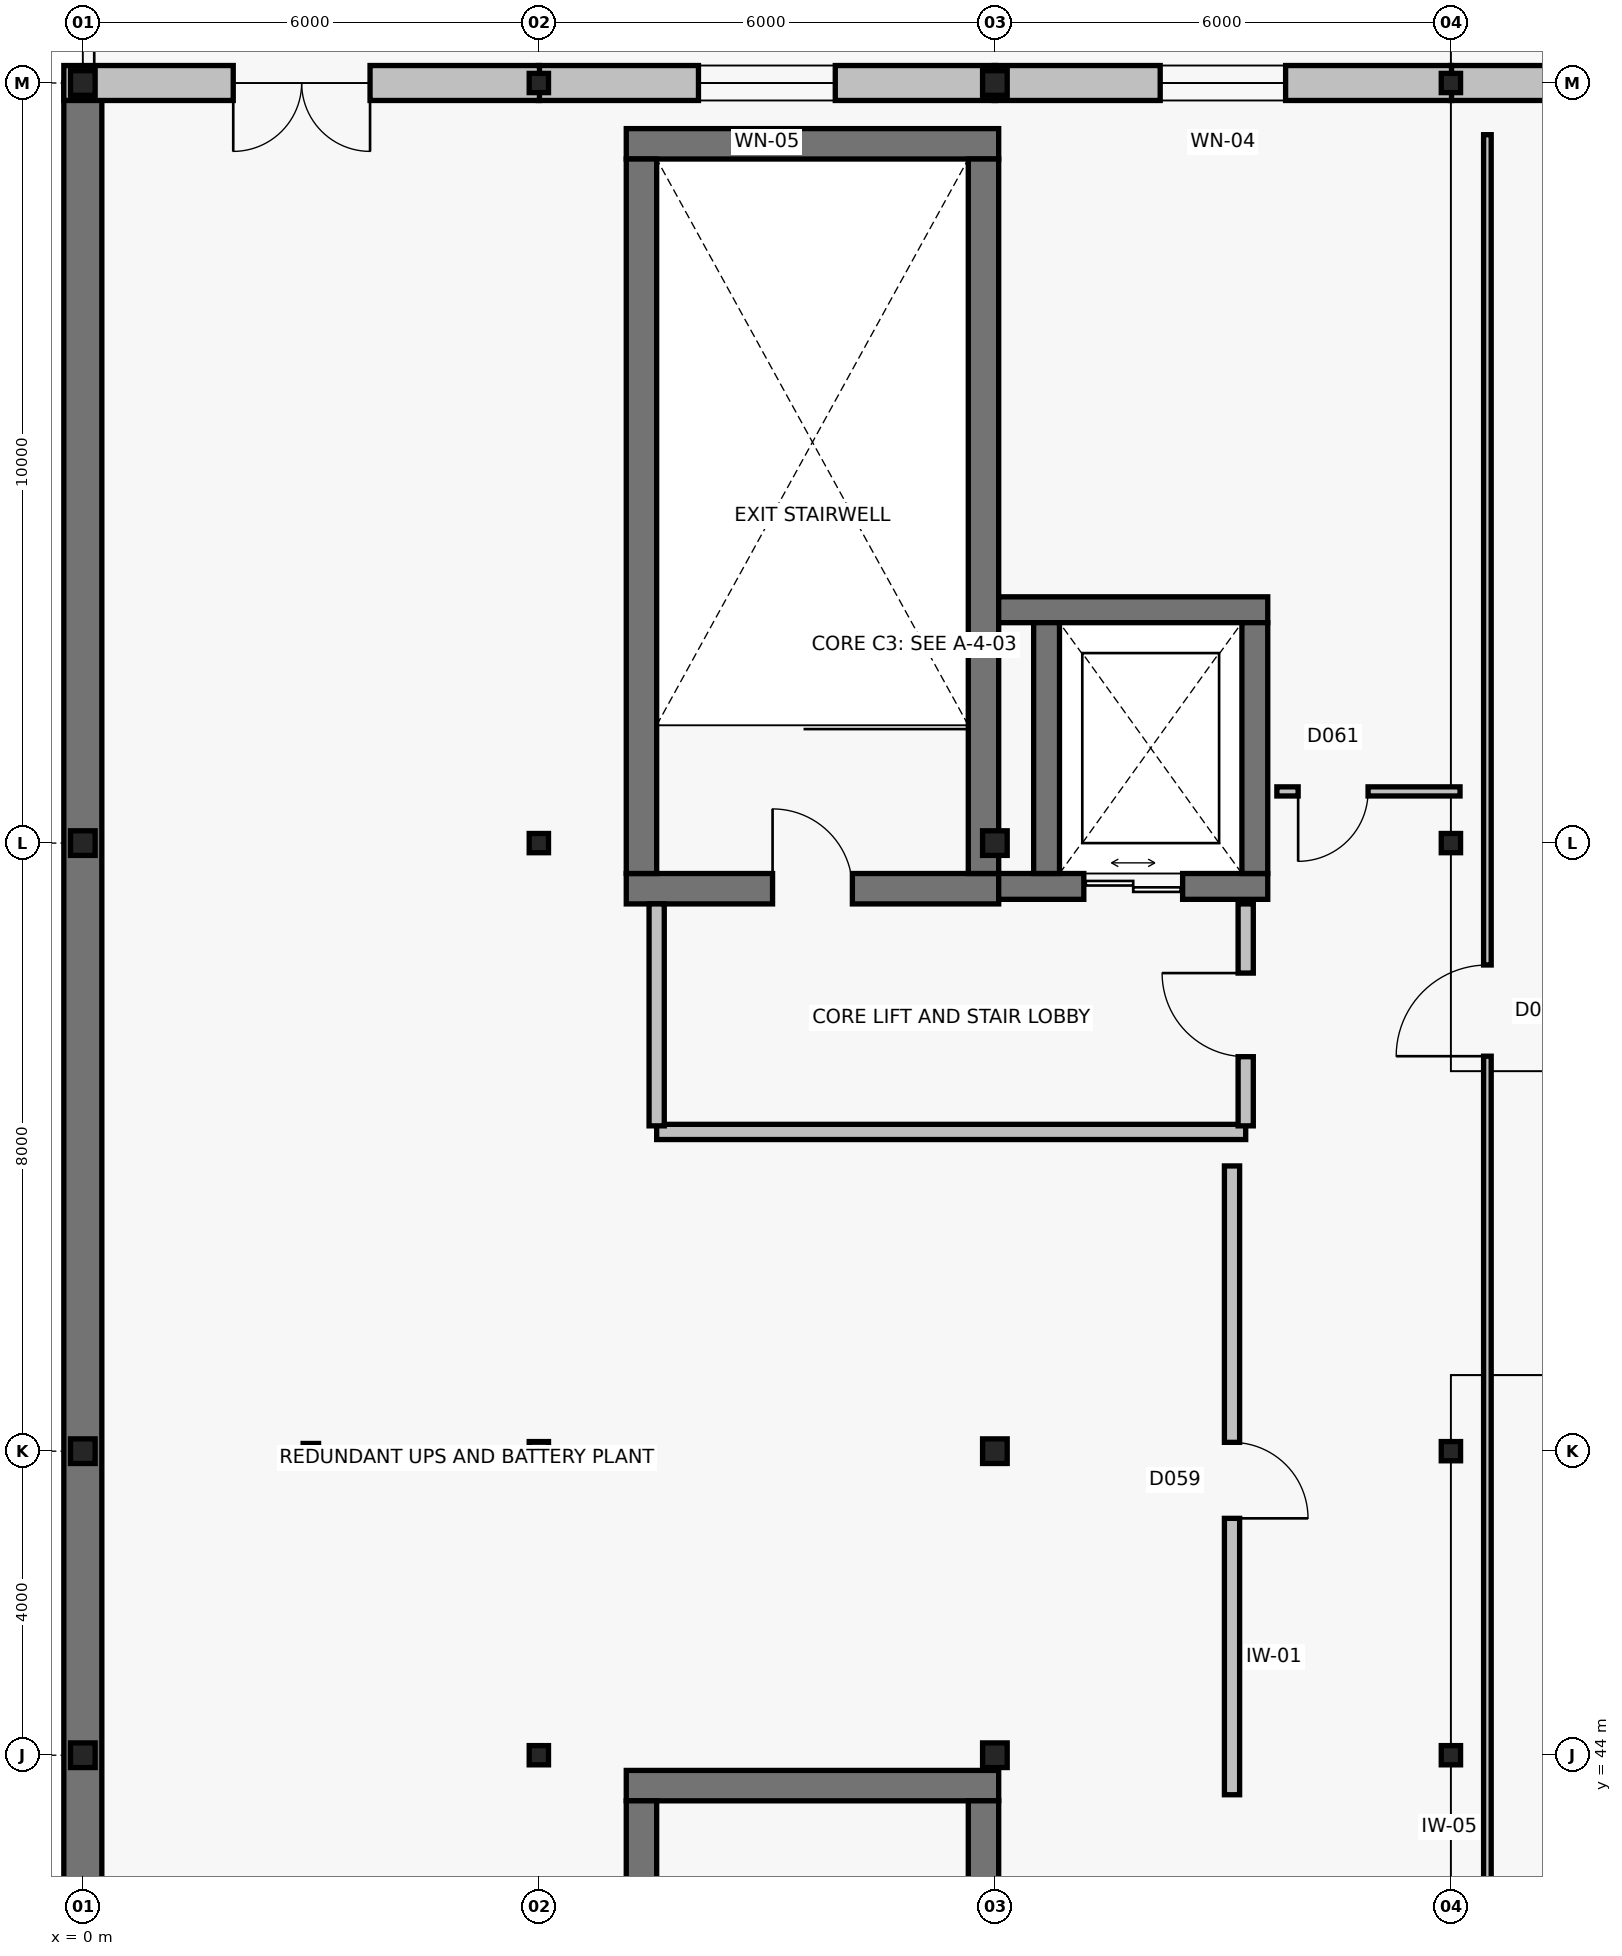
"""IFC4 building model, lengths in metres.
Left out: names, types, materials, properties, quantities, classifications, styles, units other than length and angle.
Written with IfcOpenShell. Run it as: python <this file> out.ifc"""

import sys

from ifc_helpers import new_model, si_unit, direction, frame, frame_2d, origin, origin_2d, place, context, subcontext, project, spatial, rectangle, hollow_rectangle, hollow_circle, i_section, extrude, element, fill, save


model = new_model("IFC4")
c1 = context("Model", 3, precision=1e-05, world=origin(), true_north=direction((0.0, 1.0)))
c2 = subcontext(c1, "Body", "Model", "MODEL_VIEW")
j1 = project(units=[si_unit("LENGTHUNIT", "METRE"), si_unit("PLANEANGLEUNIT", "RADIAN")], contexts=[c1])
p1 = place(None, origin())
s1 = spatial("IfcSite", under=j1, at=p1, CompositionType="ELEMENT")
p2 = place(p1, origin())
s2 = spatial("IfcBuilding", under=s1, at=p2, CompositionType="ELEMENT")
p3 = place(p2, frame((0.0, 0.0, 19.4)))
s3 = spatial("IfcBuildingStorey", under=s2, at=p3, CompositionType="ELEMENT", Elevation=19.4)
for number, where, z_axis, x_axis in (
    (1, (0.0, 44.0, 0.0), (0.0, 0.0, 1.0), (1.0, 0.0, 0.0)),
    (2, (0.0, 48.0, 0.0), (0.0, 0.0, 1.0), (1.0, 0.0, 0.0)),
    (3, (0.0, 56.0, 0.0), (0.0, 0.0, 1.0), (1.0, 0.0, 0.0)),
    (4, (0.0, 66.0, 0.0), (0.0, 0.0, 1.0), (1.0, 0.0, 0.0)),
):
    element("IfcColumn", number, at=place(p3, frame(where, z_axis=z_axis, x_axis=x_axis)), inside=s3, PredefinedType="COLUMN", context=c2, shape_type="SweptSolid", body=[
        extrude(hollow_circle(Radius=0.162, WallThickness=0.013, at=origin_2d()), origin(), (0.0, 0.0, 1.0), 4.2),
    ])
p4 = place(p3, frame((3.0, 48.0, 0.0), z_axis=(0.0, 0.0, 1.0), x_axis=(1.0, 0.0, 0.0)))
e5 = element("IfcColumn", 5, at=p4, inside=s3, PredefinedType="COLUMN", context=c2, shape_type="SweptSolid", body=[
    extrude(hollow_rectangle(XDim=0.203, YDim=0.203, WallThickness=0.01, InnerFilletRadius=0.01, OuterFilletRadius=0.019, at=origin_2d()), origin(), (0.0, 0.0, 1.0), 4.2),
])
for number, where, z_axis, x_axis in (
    (6, (6.0, 44.0, 0.0), (0.0, 0.0, 1.0), (1.0, 0.0, 0.0)),
    (7, (6.0, 48.0, 0.0), (0.0, 0.0, 1.0), (1.0, 0.0, 0.0)),
    (8, (6.0, 56.0, 0.0), (0.0, 0.0, 1.0), (1.0, 0.0, 0.0)),
    (9, (6.0, 66.0, 0.0), (0.0, 0.0, 1.0), (1.0, 0.0, 0.0)),
):
    element("IfcColumn", number, at=place(p3, frame(where, z_axis=z_axis, x_axis=x_axis)), inside=s3, PredefinedType="COLUMN", context=c2, shape_type="SweptSolid", body=[
        extrude(i_section(OverallWidth=0.254, OverallDepth=0.253, WebThickness=0.009, FlangeThickness=0.014, FilletRadius=0.012, at=origin_2d()), origin(), (0.0, 0.0, 1.0), 4.2),
    ])
for number, where, z_axis, x_axis in (
    (10, (12.0, 44.0, 0.0), (0.0, 0.0, 1.0), (1.0, 0.0, 0.0)),
    (11, (12.0, 48.0, 0.0), (0.0, 0.0, 1.0), (1.0, 0.0, 0.0)),
    (12, (12.0, 56.0, 0.0), (0.0, 0.0, 1.0), (1.0, 0.0, 0.0)),
    (13, (12.0, 66.0, 0.0), (0.0, 0.0, 1.0), (1.0, 0.0, 0.0)),
):
    element("IfcColumn", number, at=place(p3, frame(where, z_axis=z_axis, x_axis=x_axis)), inside=s3, PredefinedType="COLUMN", context=c2, shape_type="SweptSolid", body=[
        extrude(hollow_circle(Radius=0.162, WallThickness=0.013, at=origin_2d()), origin(), (0.0, 0.0, 1.0), 4.2),
    ])
for number, where, z_axis, x_axis in (
    (14, (18.0, 44.0, 0.0), (0.0, 0.0, 1.0), (1.0, 0.0, 0.0)),
    (15, (18.0, 48.0, 0.0), (0.0, 0.0, 1.0), (1.0, 0.0, 0.0)),
    (16, (18.0, 56.0, 0.0), (0.0, 0.0, 1.0), (1.0, 0.0, 0.0)),
    (17, (18.0, 66.0, 0.0), (0.0, 0.0, 1.0), (1.0, 0.0, 0.0)),
):
    element("IfcColumn", number, at=place(p3, frame(where, z_axis=z_axis, x_axis=x_axis)), inside=s3, PredefinedType="COLUMN", context=c2, shape_type="SweptSolid", body=[
        extrude(i_section(OverallWidth=0.254, OverallDepth=0.253, WebThickness=0.009, FlangeThickness=0.014, FilletRadius=0.012, at=origin_2d()), origin(), (0.0, 0.0, 1.0), 4.2),
    ])
p5 = place(p3, frame((0.0, 4.492, 0.0), z_axis=(0.0, 0.0, 1.0), x_axis=(0.0, 1.0, 0.0)))
e18 = element("IfcWall", 18, at=p5, inside=s3, PredefinedType="SOLIDWALL", context=c2, shape_type="SweptSolid", body=[
    extrude(rectangle(XDim=61.516, YDim=0.5, at=frame_2d((30.758, 0.0))), origin(), (0.0, 0.0, 1.0), 3.88),
])
p6 = place(p3, frame((24.008, 66.0, 0.0), z_axis=(0.0, 0.0, 1.0), x_axis=(-1.0, 0.0, 0.0)))
e19 = element("IfcWall", 19, at=p6, inside=s3, PredefinedType="SOLIDWALL", context=c2, shape_type="SweptSolid", body=[
    extrude(rectangle(XDim=6.016, YDim=0.46, at=frame_2d((3.008, 0.0))), origin(), (0.0, 0.0, 1.0), 3.157),
])
p7 = place(p6, frame((2.258, 0.0, 0.9)))
e20 = element("IfcOpeningElement", 20, at=p7, cuts=e19, PredefinedType="OPENING", context=c2, shape_type="SweptSolid", body=[
    extrude(rectangle(XDim=1.5, YDim=1.8, at=frame_2d((0.75, 0.9))), frame((0.0, 0.245, 0.0), z_axis=(0.0, -1.0, 0.0), x_axis=(1.0, 0.0, 0.0)), (0.0, 0.0, 1.0), 0.49),
])
p8 = place(p3, frame((18.008, 66.0, 0.0), z_axis=(0.0, 0.0, 1.0), x_axis=(-1.0, 0.0, 0.0)))
e21 = element("IfcWall", 21, at=p8, inside=s3, PredefinedType="SOLIDWALL", context=c2, shape_type="SweptSolid", body=[
    extrude(rectangle(XDim=6.016, YDim=0.46, at=frame_2d((3.008, 0.0))), origin(), (0.0, 0.0, 1.0), 3.157),
])
p9 = place(p8, frame((2.183, 0.0, 0.9)))
e22 = element("IfcOpeningElement", 22, at=p9, cuts=e21, PredefinedType="OPENING", context=c2, shape_type="SweptSolid", body=[
    extrude(rectangle(XDim=1.65, YDim=1.8, at=frame_2d((0.825, 0.9))), frame((0.0, 0.245, 0.0), z_axis=(0.0, -1.0, 0.0), x_axis=(1.0, 0.0, 0.0)), (0.0, 0.0, 1.0), 0.49),
])
p10 = place(p3, frame((12.008, 66.0, 0.0), z_axis=(0.0, 0.0, 1.0), x_axis=(-1.0, 0.0, 0.0)))
e23 = element("IfcWall", 23, at=p10, inside=s3, PredefinedType="SOLIDWALL", context=c2, shape_type="SweptSolid", body=[
    extrude(rectangle(XDim=6.016, YDim=0.46, at=frame_2d((3.008, 0.0))), origin(), (0.0, 0.0, 1.0), 3.157),
])
p11 = place(p10, frame((2.108, 0.0, 0.9)))
e24 = element("IfcOpeningElement", 24, at=p11, cuts=e23, PredefinedType="OPENING", context=c2, shape_type="SweptSolid", body=[
    extrude(rectangle(XDim=1.8, YDim=1.8, at=frame_2d((0.9, 0.9))), frame((0.0, 0.245, 0.0), z_axis=(0.0, -1.0, 0.0), x_axis=(1.0, 0.0, 0.0)), (0.0, 0.0, 1.0), 0.49),
])
p12 = place(p3, frame((6.008, 66.0, 0.0), z_axis=(0.0, 0.0, 1.0), x_axis=(-1.0, 0.0, 0.0)))
e25 = element("IfcWall", 25, at=p12, inside=s3, PredefinedType="SOLIDWALL", context=c2, shape_type="SweptSolid", body=[
    extrude(rectangle(XDim=6.258, YDim=0.46, at=frame_2d((3.129, 0.0))), origin(), (0.0, 0.0, 1.0), 3.157),
])
p13 = place(p12, frame((2.229, 0.0, 0.0)))
e26 = element("IfcOpeningElement", 26, at=p13, cuts=e25, PredefinedType="OPENING", context=c2, shape_type="SweptSolid", body=[
    extrude(rectangle(XDim=1.8, YDim=2.25, at=frame_2d((0.9, 1.125))), frame((0.0, 0.245, 0.0), z_axis=(0.0, -1.0, 0.0), x_axis=(1.0, 0.0, 0.0)), (0.0, 0.0, 1.0), 0.49),
])
p14 = place(p3, frame((12.05, 43.6, 0.0), z_axis=(0.0, 0.0, 1.0), x_axis=(-1.0, 0.0, 0.0)))
e27 = element("IfcWall", 27, at=p14, inside=s3, PredefinedType="SHEAR", context=c2, shape_type="SweptSolid", body=[
    extrude(rectangle(XDim=4.9, YDim=0.4, at=frame_2d((2.45, 0.0))), origin(), (0.0, 0.0, 1.0), 3.95),
])
for number, where, z_axis, x_axis in (
    (28, (7.35, 43.4, 0.0), (0.0, 0.0, 1.0), (0.0, -1.0, 0.0)),
    (29, (11.85, 34.0, 0.0), (0.0, 0.0, 1.0), (0.0, 1.0, 0.0)),
):
    element("IfcWall", number, at=place(p3, frame(where, z_axis=z_axis, x_axis=x_axis)), inside=s3, PredefinedType="SHEAR", context=c2, shape_type="SweptSolid", body=[
        extrude(rectangle(XDim=9.4, YDim=0.4, at=frame_2d((4.7, 0.0))), origin(), (0.0, 0.0, 1.0), 3.95),
    ])
p15 = place(p3, frame((7.15, 55.4, 0.0), z_axis=(0.0, 0.0, 1.0), x_axis=(1.0, 0.0, 0.0)))
e30 = element("IfcWall", 30, at=p15, inside=s3, PredefinedType="SHEAR", context=c2, shape_type="SweptSolid", body=[
    extrude(rectangle(XDim=4.9, YDim=0.4, at=frame_2d((2.45, 0.0))), origin(), (0.0, 0.0, 1.0), 3.95),
])
p16 = place(p15, frame((1.925, 0.0, 0.0)))
e31 = element("IfcOpeningElement", 31, at=p16, cuts=e30, PredefinedType="OPENING", context=c2, shape_type="SweptSolid", body=[
    extrude(rectangle(XDim=1.05, YDim=2.15, at=frame_2d((0.525, 1.075))), frame((0.0, 0.215, 0.0), z_axis=(0.0, -1.0, 0.0), x_axis=(1.0, 0.0, 0.0)), (0.0, 0.0, 1.0), 0.43),
])
p17 = place(p3, frame((12.05, 65.2, 0.0), z_axis=(0.0, 0.0, 1.0), x_axis=(-1.0, 0.0, 0.0)))
e32 = element("IfcWall", 32, at=p17, inside=s3, PredefinedType="SHEAR", context=c2, shape_type="SweptSolid", body=[
    extrude(rectangle(XDim=4.9, YDim=0.4, at=frame_2d((2.45, 0.0))), origin(), (0.0, 0.0, 1.0), 3.95),
])
for number, where, z_axis, x_axis in (
    (33, (7.35, 65.0, 0.0), (0.0, 0.0, 1.0), (0.0, -1.0, 0.0)),
    (34, (11.85, 55.6, 0.0), (0.0, 0.0, 1.0), (0.0, 1.0, 0.0)),
):
    element("IfcWall", number, at=place(p3, frame(where, z_axis=z_axis, x_axis=x_axis)), inside=s3, PredefinedType="SHEAR", context=c2, shape_type="SweptSolid", body=[
        extrude(rectangle(XDim=9.4, YDim=0.4, at=frame_2d((4.7, 0.0))), origin(), (0.0, 0.0, 1.0), 3.95),
    ])
p18 = place(p3, frame((12.05, 55.43, 0.0), z_axis=(0.0, 0.0, 1.0), x_axis=(1.0, 0.0, 0.0)))
e35 = element("IfcWall", 35, at=p18, inside=s3, PredefinedType="SHEAR", context=c2, shape_type="SweptSolid", body=[
    extrude(rectangle(XDim=3.54, YDim=0.34, at=frame_2d((1.77, 0.0))), origin(), (0.0, 0.0, 1.0), 3.95),
])
p19 = place(p18, frame((1.12, 0.0, 0.0)))
e36 = element("IfcOpeningElement", 36, at=p19, cuts=e35, PredefinedType="OPENING", context=c2, shape_type="SweptSolid", body=[
    extrude(rectangle(XDim=1.3, YDim=2.25, at=frame_2d((0.65, 1.125))), frame((0.0, 0.185, 0.0), z_axis=(0.0, -1.0, 0.0), x_axis=(1.0, 0.0, 0.0)), (0.0, 0.0, 1.0), 0.37),
])
p20 = place(p3, frame((15.59, 59.07, 0.0), z_axis=(0.0, 0.0, 1.0), x_axis=(-1.0, 0.0, 0.0)))
e37 = element("IfcWall", 37, at=p20, inside=s3, PredefinedType="SHEAR", context=c2, shape_type="SweptSolid", body=[
    extrude(rectangle(XDim=3.54, YDim=0.34, at=frame_2d((1.77, 0.0))), origin(), (0.0, 0.0, 1.0), 3.95),
])
for number, where, z_axis, x_axis in (
    (38, (12.68, 58.9, 0.0), (0.0, 0.0, 1.0), (0.0, -1.0, 0.0)),
    (39, (15.42, 55.6, 0.0), (0.0, 0.0, 1.0), (0.0, 1.0, 0.0)),
):
    element("IfcWall", number, at=place(p3, frame(where, z_axis=z_axis, x_axis=x_axis)), inside=s3, PredefinedType="SHEAR", context=c2, shape_type="SweptSolid", body=[
        extrude(rectangle(XDim=3.3, YDim=0.34, at=frame_2d((1.65, 0.0))), origin(), (0.0, 0.0, 1.0), 3.95),
    ])
p21 = place(p3, frame((7.55, 52.2, 0.0), z_axis=(0.0, 0.0, 1.0), x_axis=(1.0, 0.0, 0.0)))
e40 = element("IfcWall", 40, at=p21, inside=s3, PredefinedType="PARTITIONING", context=c2, shape_type="SweptSolid", body=[
    extrude(rectangle(XDim=7.75, YDim=0.2, at=frame_2d((3.875, 0.0))), origin(), (0.0, 0.0, 1.0), 3.157),
])
p22 = place(p3, frame((7.55, 55.2, 0.0), z_axis=(0.0, 0.0, 1.0), x_axis=(0.0, -1.0, 0.0)))
e41 = element("IfcWall", 41, at=p22, inside=s3, PredefinedType="PARTITIONING", context=c2, shape_type="SweptSolid", body=[
    extrude(rectangle(XDim=2.92, YDim=0.2, at=frame_2d((1.46, 0.0))), origin(), (0.0, 0.0, 1.0), 3.88),
])
p23 = place(p3, frame((15.3, 52.28, 0.0), z_axis=(0.0, 0.0, 1.0), x_axis=(0.0, 1.0, 0.0)))
e42 = element("IfcWall", 42, at=p23, inside=s3, PredefinedType="PARTITIONING", context=c2, shape_type="SweptSolid", body=[
    extrude(rectangle(XDim=2.92, YDim=0.2, at=frame_2d((1.46, 0.0))), origin(), (0.0, 0.0, 1.0), 3.88),
])
p24 = place(p23, frame((0.91, 0.0, 0.0)))
e43 = element("IfcOpeningElement", 43, at=p24, cuts=e42, PredefinedType="OPENING", context=c2, shape_type="SweptSolid", body=[
    extrude(rectangle(XDim=1.1, YDim=2.15, at=frame_2d((0.55, 1.075))), frame((0.0, 0.115, 0.0), z_axis=(0.0, -1.0, 0.0), x_axis=(1.0, 0.0, 0.0)), (0.0, 0.0, 1.0), 0.23),
])
p25 = place(p3, frame((18.48, 32.91, 0.0), z_axis=(0.0, 0.0, 1.0), x_axis=(0.0, 1.0, 0.0)))
e44 = element("IfcWall", 44, at=p25, inside=s3, PredefinedType="PARTITIONING", context=c2, shape_type="SweptSolid", body=[
    extrude(rectangle(XDim=32.41, YDim=0.1, at=frame_2d((16.205, 0.0))), origin(), (0.0, 0.0, 1.0), 3.311),
])
p26 = place(p25, frame((20.287, 0.0, 0.0)))
e45 = element("IfcOpeningElement", 45, at=p26, cuts=e44, PredefinedType="OPENING", context=c2, shape_type="SweptSolid", body=[
    extrude(rectangle(XDim=1.2, YDim=2.15, at=frame_2d((0.6, 1.075))), frame((0.0, 0.065, 0.0), z_axis=(0.0, -1.0, 0.0), x_axis=(1.0, 0.0, 0.0)), (0.0, 0.0, 1.0), 0.13),
])
p27 = place(p3, frame((15.12, 51.753, 0.0), z_axis=(0.0, 0.0, 1.0), x_axis=(0.0, -1.0, 0.0)))
e46 = element("IfcWall", 46, at=p27, inside=s3, PredefinedType="PARTITIONING", context=c2, shape_type="SweptSolid", body=[
    extrude(rectangle(XDim=8.273, YDim=0.2, at=frame_2d((4.136, 0.0))), origin(), (0.0, 0.0, 1.0), 3.44),
])
p28 = place(p27, frame((3.636, 0.0, 0.0)))
e47 = element("IfcOpeningElement", 47, at=p28, cuts=e46, PredefinedType="OPENING", context=c2, shape_type="SweptSolid", body=[
    extrude(rectangle(XDim=1.0, YDim=2.15, at=frame_2d((0.5, 1.075))), frame((0.0, 0.115, 0.0), z_axis=(0.0, -1.0, 0.0), x_axis=(1.0, 0.0, 0.0)), (0.0, 0.0, 1.0), 0.23),
])
p29 = place(p3, frame((18.12, 56.68, 0.0), z_axis=(0.0, 0.0, 1.0), x_axis=(-1.0, 0.0, 0.0)))
e48 = element("IfcWall", 48, at=p29, inside=s3, PredefinedType="PARTITIONING", context=c2, shape_type="SweptSolid", body=[
    extrude(rectangle(XDim=2.41, YDim=0.12, at=frame_2d((1.205, 0.0))), origin(), (0.0, 0.0, 1.0), 3.157),
])
p30 = place(p29, frame((1.21, 0.0, 0.0)))
e49 = element("IfcOpeningElement", 49, at=p30, cuts=e48, PredefinedType="OPENING", context=c2, shape_type="SweptSolid", body=[
    extrude(rectangle(XDim=0.92, YDim=2.1, at=frame_2d((0.46, 1.05))), frame((0.0, 0.075, 0.0), z_axis=(0.0, -1.0, 0.0), x_axis=(1.0, 0.0, 0.0)), (0.0, 0.0, 1.0), 0.15),
])
p31 = place(p9, origin())
e50 = element("IfcWindow", 50, at=p31, inside=s3, PartitioningType="SINGLE_PANEL", PredefinedType="WINDOW", context=c2, shape_type="SweptSolid", body=[
    extrude(rectangle(XDim=1.65, YDim=1.8, at=frame_2d((0.825, 0.9))), frame((0.0, 0.03, 0.0), z_axis=(0.0, -1.0, 0.0), x_axis=(1.0, 0.0, 0.0)), (0.0, 0.0, 1.0), 0.06),
])
fill(e22, e50)
p32 = place(p11, origin())
e51 = element("IfcWindow", 51, at=p32, inside=s3, PartitioningType="SINGLE_PANEL", PredefinedType="WINDOW", context=c2, shape_type="SweptSolid", body=[
    extrude(rectangle(XDim=1.8, YDim=1.8, at=frame_2d((0.9, 0.9))), frame((0.0, 0.03, 0.0), z_axis=(0.0, -1.0, 0.0), x_axis=(1.0, 0.0, 0.0)), (0.0, 0.0, 1.0), 0.06),
])
fill(e24, e51)
p33 = place(p13, origin())
e52 = element("IfcDoor", 52, at=p33, inside=s3, OperationType="DOUBLE_DOOR_SINGLE_SWING", PredefinedType="DOOR", context=c2, shape_type="SweptSolid", body=[
    extrude(rectangle(XDim=1.8, YDim=2.25, at=frame_2d((0.9, 1.125))), frame((0.0, 0.025, 0.0), z_axis=(0.0, -1.0, 0.0), x_axis=(1.0, 0.0, 0.0)), (0.0, 0.0, 1.0), 0.05),
])
fill(e26, e52)
p34 = place(p16, origin())
e53 = element("IfcDoor", 53, at=p34, inside=s3, OperationType="SINGLE_SWING_LEFT", PredefinedType="DOOR", context=c2, shape_type="SweptSolid", body=[
    extrude(rectangle(XDim=1.05, YDim=2.15, at=frame_2d((0.525, 1.075))), frame((0.0, 0.025, 0.0), z_axis=(0.0, -1.0, 0.0), x_axis=(1.0, 0.0, 0.0)), (0.0, 0.0, 1.0), 0.05),
])
fill(e31, e53)
p35 = place(p19, origin())
e54 = element("IfcDoor", 54, at=p35, inside=s3, OperationType="DOUBLE_DOOR_SLIDING", PredefinedType="DOOR", context=c2, shape_type="SweptSolid", body=[
    extrude(rectangle(XDim=1.3, YDim=2.25, at=frame_2d((0.65, 1.125))), frame((0.0, 0.025, 0.0), z_axis=(0.0, -1.0, 0.0), x_axis=(1.0, 0.0, 0.0)), (0.0, 0.0, 1.0), 0.05),
])
fill(e36, e54)
p36 = place(p24, origin())
e55 = element("IfcDoor", 55, at=p36, inside=s3, OperationType="SINGLE_SWING_RIGHT", PredefinedType="DOOR", context=c2, shape_type="SweptSolid", body=[
    extrude(rectangle(XDim=1.1, YDim=2.15, at=frame_2d((0.55, 1.075))), frame((0.0, 0.025, 0.0), z_axis=(0.0, -1.0, 0.0), x_axis=(1.0, 0.0, 0.0)), (0.0, 0.0, 1.0), 0.05),
])
fill(e43, e55)
p37 = place(p26, origin())
e56 = element("IfcDoor", 56, at=p37, inside=s3, OperationType="SINGLE_SWING_LEFT", PredefinedType="DOOR", context=c2, shape_type="SweptSolid", body=[
    extrude(rectangle(XDim=1.2, YDim=2.15, at=frame_2d((0.6, 1.075))), frame((0.0, 0.025, 0.0), z_axis=(0.0, -1.0, 0.0), x_axis=(1.0, 0.0, 0.0)), (0.0, 0.0, 1.0), 0.05),
])
fill(e45, e56)
p38 = place(p28, origin())
e57 = element("IfcDoor", 57, at=p38, inside=s3, OperationType="SINGLE_SWING_RIGHT", PredefinedType="DOOR", context=c2, shape_type="SweptSolid", body=[
    extrude(rectangle(XDim=1.0, YDim=2.15, at=frame_2d((0.5, 1.075))), frame((0.0, 0.025, 0.0), z_axis=(0.0, -1.0, 0.0), x_axis=(1.0, 0.0, 0.0)), (0.0, 0.0, 1.0), 0.05),
])
fill(e47, e57)
p39 = place(p30, origin())
e58 = element("IfcDoor", 58, at=p39, inside=s3, OperationType="SINGLE_SWING_RIGHT", PredefinedType="DOOR", context=c2, shape_type="SweptSolid", body=[
    extrude(rectangle(XDim=0.92, YDim=2.1, at=frame_2d((0.46, 1.05))), frame((0.0, 0.025, 0.0), z_axis=(0.0, -1.0, 0.0), x_axis=(1.0, 0.0, 0.0)), (0.0, 0.0, 1.0), 0.05),
])
fill(e49, e58)
save(model, sys.argv[1])
